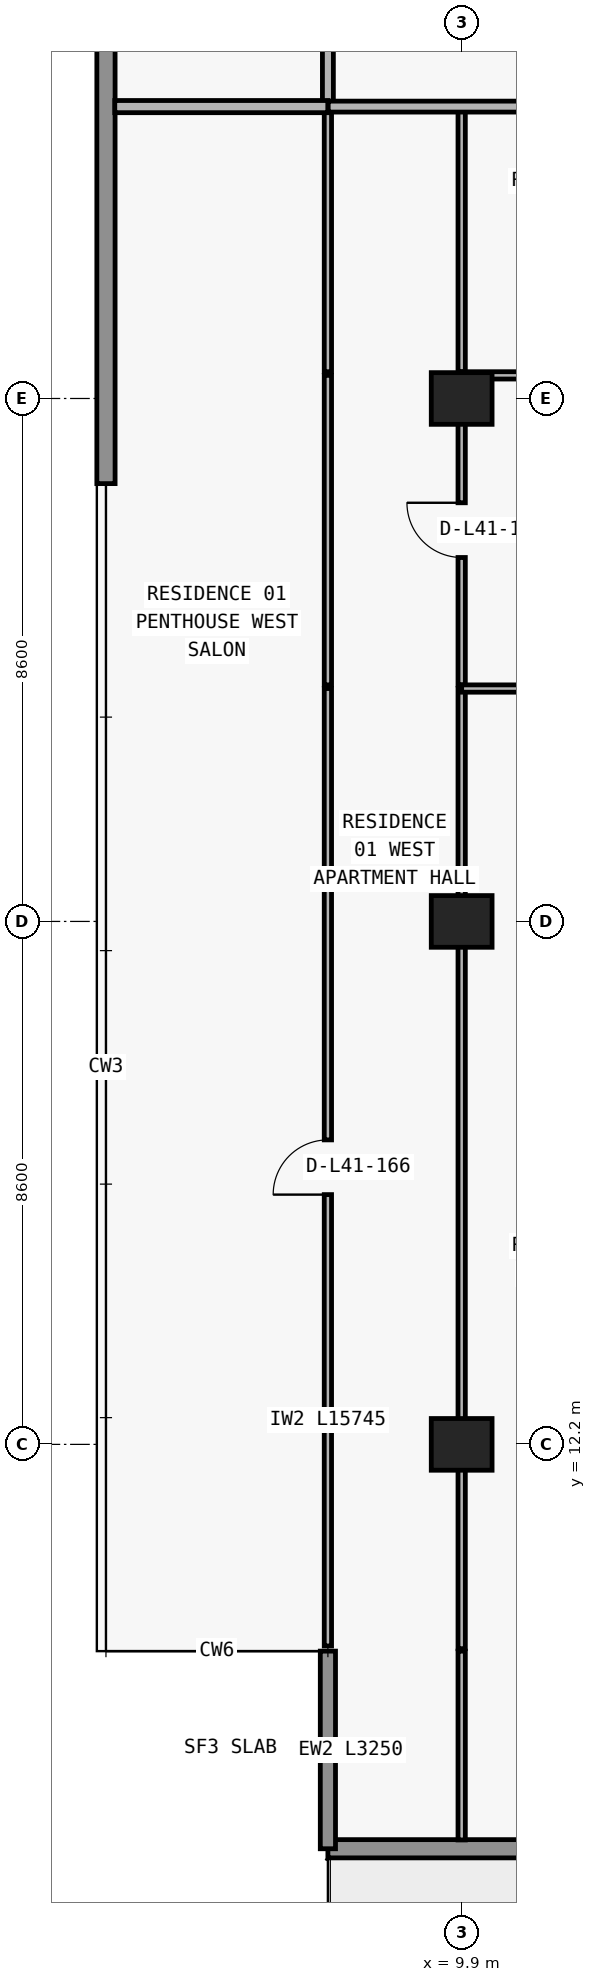
"""IFC4 building model, lengths in metres.
Left out: names, types, materials, properties, quantities, classifications, styles, units other than length and angle.
Written with IfcOpenShell. Run it as: python <this file> out.ifc"""

import sys

from ifc_helpers import new_model, si_unit, direction, frame, frame_2d, origin, origin_2d, place, context, subcontext, project, spatial, rectangle, extrude, element, fill, save


model = new_model("IFC4")
c1 = context("Model", 3, precision=1e-05, world=origin(), true_north=direction((0.0, 1.0)))
c2 = subcontext(c1, "Body", "Model", "MODEL_VIEW")
j1 = project(units=[si_unit("LENGTHUNIT", "METRE"), si_unit("PLANEANGLEUNIT", "RADIAN")], contexts=[c1])
p1 = place(None, origin())
s1 = spatial("IfcSite", under=j1, at=p1, CompositionType="ELEMENT")
p2 = place(p1, origin())
s2 = spatial("IfcBuilding", under=s1, at=p2, CompositionType="ELEMENT")
p3 = place(p2, frame((0.0, 0.0, 148.8)))
s3 = spatial("IfcBuildingStorey", under=s2, at=p3, CompositionType="ELEMENT", Elevation=148.8)
for number, where, z_axis, x_axis in (
    (1, (9.9, 12.2, 0.0), (0.0, 0.0, 1.0), (1.0, 0.0, 0.0)),
    (2, (9.9, 20.8, 0.0), (0.0, 0.0, 1.0), (1.0, 0.0, 0.0)),
    (3, (9.9, 29.4, 0.0), (0.0, 0.0, 1.0), (1.0, 0.0, 0.0)),
):
    element("IfcColumn", number, at=place(p3, frame(where, z_axis=z_axis, x_axis=x_axis)), inside=s3, PredefinedType="COLUMN", context=c2, shape_type="SweptSolid", body=[
        extrude(rectangle(XDim=1.0, YDim=0.85, at=origin_2d()), origin(), (0.0, 0.0, 1.0), 3.0),
    ])
p4 = place(p3, frame((70.1, 5.55, 0.0), z_axis=(0.0, 0.0, 1.0), x_axis=(-1.0, 0.0, 0.0)))
e4 = element("IfcWall", 4, at=p4, inside=s3, PredefinedType="STANDARD", context=c2, shape_type="SweptSolid", body=[
    extrude(rectangle(XDim=62.4, YDim=0.3, at=frame_2d((31.2, 0.0))), origin(), (0.0, 0.0, 1.0), 3.0),
])
p5 = place(p4, frame((57.226, 0.0, 0.0)))
e5 = element("IfcOpeningElement", 5, at=p5, cuts=e4, PredefinedType="OPENING", context=c2, shape_type="SweptSolid", body=[
    extrude(rectangle(XDim=2.0, YDim=2.3, at=frame_2d((1.0, 1.15))), frame((0.0, 0.16, 0.0), z_axis=(0.0, -1.0, 0.0), x_axis=(1.0, 0.0, 0.0)), (0.0, 0.0, 1.0), 0.32),
])
p6 = place(p4, frame((52.926, 0.0, 0.85)))
e6 = element("IfcOpeningElement", 6, at=p6, cuts=e4, PredefinedType="OPENING", context=c2, shape_type="SweptSolid", body=[
    extrude(rectangle(XDim=2.2, YDim=1.55, at=frame_2d((1.1, 0.775))), frame((0.0, 0.16, 0.0), z_axis=(0.0, -1.0, 0.0), x_axis=(1.0, 0.0, 0.0)), (0.0, 0.0, 1.0), 0.32),
])
p7 = place(p4, frame((48.49, 0.0, 0.0)))
e7 = element("IfcOpeningElement", 7, at=p7, cuts=e4, PredefinedType="OPENING", context=c2, shape_type="SweptSolid", body=[
    extrude(rectangle(XDim=2.0, YDim=2.3, at=frame_2d((1.0, 1.15))), frame((0.0, 0.16, 0.0), z_axis=(0.0, -1.0, 0.0), x_axis=(1.0, 0.0, 0.0)), (0.0, 0.0, 1.0), 0.32),
])
p8 = place(p4, frame((44.39, 0.0, 0.85)))
e8 = element("IfcOpeningElement", 8, at=p8, cuts=e4, PredefinedType="OPENING", context=c2, shape_type="SweptSolid", body=[
    extrude(rectangle(XDim=1.8, YDim=1.55, at=frame_2d((0.9, 0.775))), frame((0.0, 0.16, 0.0), z_axis=(0.0, -1.0, 0.0), x_axis=(1.0, 0.0, 0.0)), (0.0, 0.0, 1.0), 0.32),
])
p9 = place(p4, frame((40.426, 0.0, 0.0)))
e9 = element("IfcOpeningElement", 9, at=p9, cuts=e4, PredefinedType="OPENING", context=c2, shape_type="SweptSolid", body=[
    extrude(rectangle(XDim=2.0, YDim=2.3, at=frame_2d((1.0, 1.15))), frame((0.0, 0.16, 0.0), z_axis=(0.0, -1.0, 0.0), x_axis=(1.0, 0.0, 0.0)), (0.0, 0.0, 1.0), 0.32),
])
p10 = place(p4, frame((36.126, 0.0, 0.85)))
e10 = element("IfcOpeningElement", 10, at=p10, cuts=e4, PredefinedType="OPENING", context=c2, shape_type="SweptSolid", body=[
    extrude(rectangle(XDim=2.2, YDim=1.55, at=frame_2d((1.1, 0.775))), frame((0.0, 0.16, 0.0), z_axis=(0.0, -1.0, 0.0), x_axis=(1.0, 0.0, 0.0)), (0.0, 0.0, 1.0), 0.32),
])
p11 = place(p4, frame((32.09, 0.0, 0.0)))
e11 = element("IfcOpeningElement", 11, at=p11, cuts=e4, PredefinedType="OPENING", context=c2, shape_type="SweptSolid", body=[
    extrude(rectangle(XDim=2.0, YDim=2.3, at=frame_2d((1.0, 1.15))), frame((0.0, 0.16, 0.0), z_axis=(0.0, -1.0, 0.0), x_axis=(1.0, 0.0, 0.0)), (0.0, 0.0, 1.0), 0.32),
])
p12 = place(p4, frame((28.21, 0.0, 0.65)))
e12 = element("IfcOpeningElement", 12, at=p12, cuts=e4, PredefinedType="OPENING", context=c2, shape_type="SweptSolid", body=[
    extrude(rectangle(XDim=2.6, YDim=1.85, at=frame_2d((1.3, 0.925))), frame((0.0, 0.16, 0.0), z_axis=(0.0, -1.0, 0.0), x_axis=(1.0, 0.0, 0.0)), (0.0, 0.0, 1.0), 0.32),
])
p13 = place(p4, frame((22.1, 0.0, 0.85)))
e13 = element("IfcOpeningElement", 13, at=p13, cuts=e4, PredefinedType="OPENING", context=c2, shape_type="SweptSolid", body=[
    extrude(rectangle(XDim=2.2, YDim=1.55, at=frame_2d((1.1, 0.775))), frame((0.0, 0.16, 0.0), z_axis=(0.0, -1.0, 0.0), x_axis=(1.0, 0.0, 0.0)), (0.0, 0.0, 1.0), 0.32),
])
p14 = place(p4, frame((16.09, 0.0, 0.0)))
e14 = element("IfcOpeningElement", 14, at=p14, cuts=e4, PredefinedType="OPENING", context=c2, shape_type="SweptSolid", body=[
    extrude(rectangle(XDim=2.0, YDim=2.3, at=frame_2d((1.0, 1.15))), frame((0.0, 0.16, 0.0), z_axis=(0.0, -1.0, 0.0), x_axis=(1.0, 0.0, 0.0)), (0.0, 0.0, 1.0), 0.32),
])
p15 = place(p4, frame((11.41, 0.0, 0.65)))
e15 = element("IfcOpeningElement", 15, at=p15, cuts=e4, PredefinedType="OPENING", context=c2, shape_type="SweptSolid", body=[
    extrude(rectangle(XDim=2.6, YDim=1.85, at=frame_2d((1.3, 0.925))), frame((0.0, 0.16, 0.0), z_axis=(0.0, -1.0, 0.0), x_axis=(1.0, 0.0, 0.0)), (0.0, 0.0, 1.0), 0.32),
])
p16 = place(p4, frame((5.3, 0.0, 0.85)))
e16 = element("IfcOpeningElement", 16, at=p16, cuts=e4, PredefinedType="OPENING", context=c2, shape_type="SweptSolid", body=[
    extrude(rectangle(XDim=2.2, YDim=1.55, at=frame_2d((1.1, 0.775))), frame((0.0, 0.16, 0.0), z_axis=(0.0, -1.0, 0.0), x_axis=(1.0, 0.0, 0.0)), (0.0, 0.0, 1.0), 0.32),
])
p17 = place(p3, frame((7.7, 8.8, 0.0), z_axis=(0.0, 0.0, 1.0), x_axis=(0.0, -1.0, 0.0)))
e17 = element("IfcWall", 17, at=p17, inside=s3, PredefinedType="ELEMENTEDWALL", context=c2, shape_type="SweptSolid", body=[
    extrude(rectangle(XDim=3.25, YDim=0.25, at=frame_2d((1.625, 0.0))), origin(), (0.0, 0.0, 1.0), 3.0),
])
p18 = place(p3, frame((4.05, 28.0, 0.0), z_axis=(0.0, 0.0, 1.0), x_axis=(0.0, 1.0, 0.0)))
e18 = element("IfcWall", 18, at=p18, inside=s3, PredefinedType="STANDARD", context=c2, shape_type="SweptSolid", body=[
    extrude(rectangle(XDim=19.2, YDim=0.3, at=frame_2d((9.6, 0.0))), origin(), (0.0, 0.0, 1.0), 3.0),
])
p19 = place(p3, frame((7.7, 8.885, 0.0), z_axis=(0.0, 0.0, 1.0), x_axis=(0.0, 1.0, 0.0)))
e19 = element("IfcWall", 19, at=p19, inside=s3, PredefinedType="PARTITIONING", context=c2, shape_type="SweptSolid", body=[
    extrude(rectangle(XDim=15.745, YDim=0.12, at=frame_2d((7.873, 0.0))), origin(), (0.0, 0.0, 1.0), 3.0),
])
p20 = place(p19, frame((7.423, 0.0, 0.0)))
e20 = element("IfcOpeningElement", 20, at=p20, cuts=e19, PredefinedType="OPENING", context=c2, shape_type="SweptSolid", body=[
    extrude(rectangle(XDim=0.9, YDim=2.15, at=frame_2d((0.45, 1.075))), frame((0.0, 0.07, 0.0), z_axis=(0.0, -1.0, 0.0), x_axis=(1.0, 0.0, 0.0)), (0.0, 0.0, 1.0), 0.14),
])
p21 = place(p3, frame((7.7, 24.69, 0.0), z_axis=(0.0, 0.0, 1.0), x_axis=(0.0, 1.0, 0.0)))
e21 = element("IfcWall", 21, at=p21, inside=s3, PredefinedType="PARTITIONING", context=c2, shape_type="SweptSolid", body=[
    extrude(rectangle(XDim=5.09, YDim=0.12, at=frame_2d((2.545, 0.0))), origin(), (0.0, 0.0, 1.0), 3.0),
])
p22 = place(p3, frame((7.7, 29.84, 0.0), z_axis=(0.0, 0.0, 1.0), x_axis=(0.0, 1.0, 0.0)))
e22 = element("IfcWall", 22, at=p22, inside=s3, PredefinedType="PARTITIONING", context=c2, shape_type="SweptSolid", body=[
    extrude(rectangle(XDim=4.36, YDim=0.12, at=frame_2d((2.18, 0.0))), origin(), (0.0, 0.0, 1.0), 3.0),
])
p23 = place(p3, frame((7.7, 34.205, 0.0), z_axis=(0.0, 0.0, 1.0), x_axis=(0.0, 1.0, 0.0)))
e23 = element("IfcWall", 23, at=p23, inside=s3, PredefinedType="PARTITIONING", context=c2, shape_type="SweptSolid", body=[
    extrude(rectangle(XDim=2.745, YDim=0.18, at=frame_2d((1.373, 0.0))), origin(), (0.0, 0.0, 1.0), 3.0),
])
p24 = place(p3, frame((9.9, 5.695, 0.0), z_axis=(0.0, 0.0, 1.0), x_axis=(0.0, 1.0, 0.0)))
e24 = element("IfcWall", 24, at=p24, inside=s3, PredefinedType="PARTITIONING", context=c2, shape_type="SweptSolid", body=[
    extrude(rectangle(XDim=3.105, YDim=0.12, at=frame_2d((1.552, 0.0))), origin(), (0.0, 0.0, 1.0), 3.0),
])
p25 = place(p3, frame((9.9, 8.84, 0.0), z_axis=(0.0, 0.0, 1.0), x_axis=(0.0, 1.0, 0.0)))
e25 = element("IfcWall", 25, at=p25, inside=s3, PredefinedType="PARTITIONING", context=c2, shape_type="SweptSolid", body=[
    extrude(rectangle(XDim=15.79, YDim=0.12, at=frame_2d((7.895, 0.0))), origin(), (0.0, 0.0, 1.0), 2.124),
])
p26 = place(p3, frame((9.9, 24.69, 0.0), z_axis=(0.0, 0.0, 1.0), x_axis=(0.0, 1.0, 0.0)))
e26 = element("IfcWall", 26, at=p26, inside=s3, PredefinedType="PARTITIONING", context=c2, shape_type="SweptSolid", body=[
    extrude(rectangle(XDim=5.09, YDim=0.12, at=frame_2d((2.545, 0.0))), origin(), (0.0, 0.0, 1.0), 2.124),
])
p27 = place(p26, frame((2.095, 0.0, 0.0)))
e27 = element("IfcOpeningElement", 27, at=p27, cuts=e26, PredefinedType="OPENING", context=c2, shape_type="SweptSolid", body=[
    extrude(rectangle(XDim=0.9, YDim=2.074, at=frame_2d((0.45, 1.037))), frame((0.0, 0.07, 0.0), z_axis=(0.0, -1.0, 0.0), x_axis=(1.0, 0.0, 0.0)), (0.0, 0.0, 1.0), 0.14),
])
p28 = place(p3, frame((9.9, 29.84, 0.0), z_axis=(0.0, 0.0, 1.0), x_axis=(0.0, 1.0, 0.0)))
e28 = element("IfcWall", 28, at=p28, inside=s3, PredefinedType="PARTITIONING", context=c2, shape_type="SweptSolid", body=[
    extrude(rectangle(XDim=4.36, YDim=0.12, at=frame_2d((2.18, 0.0))), origin(), (0.0, 0.0, 1.0), 2.124),
])
p29 = place(p3, frame((9.9, 24.63, 0.0), z_axis=(0.0, 0.0, 1.0), x_axis=(1.0, 0.0, 0.0)))
e29 = element("IfcWall", 29, at=p29, inside=s3, PredefinedType="PARTITIONING", context=c2, shape_type="SweptSolid", body=[
    extrude(rectangle(XDim=8.35, YDim=0.12, at=frame_2d((4.175, 0.0))), origin(), (0.0, 0.0, 1.0), 3.0),
])
p30 = place(p29, frame((1.524, 0.0, 0.0)))
e30 = element("IfcOpeningElement", 30, at=p30, cuts=e29, PredefinedType="OPENING", context=c2, shape_type="SweptSolid", body=[
    extrude(rectangle(XDim=0.9, YDim=2.15, at=frame_2d((0.45, 1.075))), frame((0.0, 0.07, 0.0), z_axis=(0.0, -1.0, 0.0), x_axis=(1.0, 0.0, 0.0)), (0.0, 0.0, 1.0), 0.14),
])
p31 = place(p29, frame((5.993, 0.0, 0.0)))
e31 = element("IfcOpeningElement", 31, at=p31, cuts=e29, PredefinedType="OPENING", context=c2, shape_type="SweptSolid", body=[
    extrude(rectangle(XDim=0.9, YDim=2.15, at=frame_2d((0.45, 1.075))), frame((0.0, 0.07, 0.0), z_axis=(0.0, -1.0, 0.0), x_axis=(1.0, 0.0, 0.0)), (0.0, 0.0, 1.0), 0.14),
])
p32 = place(p3, frame((9.9, 29.78, 0.0), z_axis=(0.0, 0.0, 1.0), x_axis=(1.0, 0.0, 0.0)))
e32 = element("IfcWall", 32, at=p32, inside=s3, PredefinedType="PARTITIONING", context=c2, shape_type="SweptSolid", body=[
    extrude(rectangle(XDim=8.35, YDim=0.12, at=frame_2d((4.175, 0.0))), origin(), (0.0, 0.0, 1.0), 3.0),
])
p33 = place(p32, frame((1.818, 0.0, 0.0)))
e33 = element("IfcOpeningElement", 33, at=p33, cuts=e32, PredefinedType="OPENING", context=c2, shape_type="SweptSolid", body=[
    extrude(rectangle(XDim=0.9, YDim=2.15, at=frame_2d((0.45, 1.075))), frame((0.0, 0.07, 0.0), z_axis=(0.0, -1.0, 0.0), x_axis=(1.0, 0.0, 0.0)), (0.0, 0.0, 1.0), 0.14),
])
p34 = place(p3, frame((4.195, 34.2, 0.0), z_axis=(0.0, 0.0, 1.0), x_axis=(1.0, 0.0, 0.0)))
e34 = element("IfcWall", 34, at=p34, inside=s3, PredefinedType="PARTITIONING", context=c2, shape_type="SweptSolid", body=[
    extrude(rectangle(XDim=3.505, YDim=0.2, at=frame_2d((1.752, 0.0))), origin(), (0.0, 0.0, 1.0), 3.0),
])
p35 = place(p3, frame((7.705, 34.2, 0.0), z_axis=(0.0, 0.0, 1.0), x_axis=(1.0, 0.0, 0.0)))
e35 = element("IfcWall", 35, at=p35, inside=s3, PredefinedType="PARTITIONING", context=c2, shape_type="SweptSolid", body=[
    extrude(rectangle(XDim=10.545, YDim=0.18, at=frame_2d((5.272, 0.0))), origin(), (0.0, 0.0, 1.0), 3.0),
])
p36 = place(p35, frame((4.73, 0.0, 0.0)))
e36 = element("IfcOpeningElement", 36, at=p36, cuts=e35, PredefinedType="OPENING", context=c2, shape_type="SweptSolid", body=[
    extrude(rectangle(XDim=1.0, YDim=2.2, at=frame_2d((0.5, 1.1))), frame((0.0, 0.1, 0.0), z_axis=(0.0, -1.0, 0.0), x_axis=(1.0, 0.0, 0.0)), (0.0, 0.0, 1.0), 0.2),
])
p37 = place(p27, origin())
e37 = element("IfcDoor", 37, at=p37, inside=s3, OperationType="SINGLE_SWING_RIGHT", PredefinedType="DOOR", context=c2, shape_type="SweptSolid", body=[
    extrude(rectangle(XDim=0.9, YDim=2.074, at=frame_2d((0.45, 1.037))), frame((0.0, 0.025, 0.0), z_axis=(0.0, -1.0, 0.0), x_axis=(1.0, 0.0, 0.0)), (0.0, 0.0, 1.0), 0.05),
])
fill(e27, e37)
p38 = place(p20, origin())
e38 = element("IfcDoor", 38, at=p38, inside=s3, OperationType="SINGLE_SWING_LEFT", PredefinedType="DOOR", context=c2, shape_type="SweptSolid", body=[
    extrude(rectangle(XDim=0.9, YDim=2.15, at=frame_2d((0.45, 1.075))), frame((0.0, 0.025, 0.0), z_axis=(0.0, -1.0, 0.0), x_axis=(1.0, 0.0, 0.0)), (0.0, 0.0, 1.0), 0.05),
])
fill(e20, e38)
save(model, sys.argv[1])
